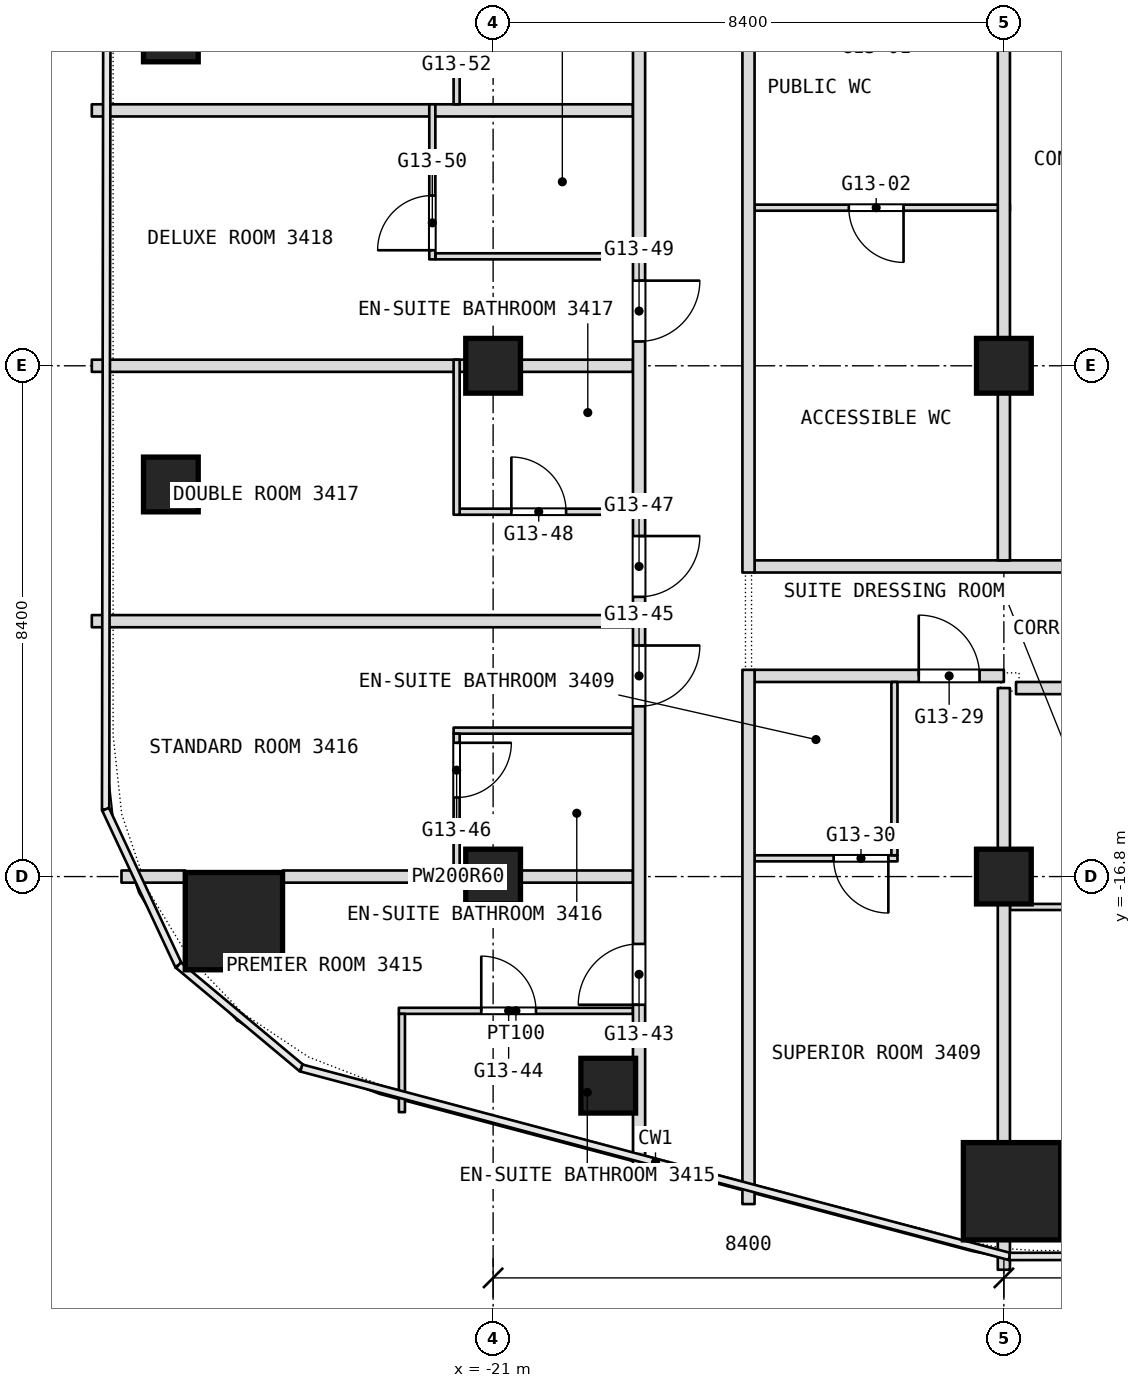
"""IFC4 building model, lengths in metres.
Left out: names, types, materials, properties, quantities, classifications, styles, units other than length and angle.
Written with IfcOpenShell. Run it as: python <this file> out.ifc"""

import sys

from ifc_helpers import new_model, si_unit, direction, frame, frame_2d, origin, origin_2d, place, context, subcontext, project, spatial, rectangle, extrude, element, fill, save


model = new_model("IFC4")
c1 = context("Model", 3, precision=1e-05, world=origin(), true_north=direction((0.0, 1.0)))
c2 = subcontext(c1, "Body", "Model", "MODEL_VIEW")
j1 = project(units=[si_unit("LENGTHUNIT", "METRE"), si_unit("PLANEANGLEUNIT", "RADIAN")], contexts=[c1])
p1 = place(None, origin())
s1 = spatial("IfcSite", under=j1, at=p1, CompositionType="ELEMENT")
p2 = place(p1, origin())
s2 = spatial("IfcBuilding", under=s1, at=p2, CompositionType="ELEMENT")
p3 = place(p2, frame((0.0, 0.0, 148.1)))
s3 = spatial("IfcBuildingStorey", under=s2, at=p3, CompositionType="ELEMENT", Elevation=148.1)
for number, where, z_axis, x_axis in (
    (1, (-25.263, -17.533, 0.0), (0.0, 0.0, 1.0), (1.0, 0.0, 0.0)),
    (2, (-12.466, -21.975, 0.0), (0.0, 0.0, 1.0), (1.0, 0.0, 0.0)),
):
    element("IfcColumn", number, at=place(p3, frame(where, z_axis=z_axis, x_axis=x_axis)), inside=s3, PredefinedType="COLUMN", context=c2, shape_type="SweptSolid", body=[
        extrude(rectangle(XDim=1.6, YDim=1.6, at=origin_2d()), origin(), (0.0, 0.0, 1.0), 3.6),
    ])
for number, where, z_axis, x_axis in (
    (3, (-21.0, -16.8, 0.0), (0.0, 0.0, 1.0), (1.0, 0.0, 0.0)),
    (4, (-21.0, -8.4, 0.0), (0.0, 0.0, 1.0), (1.0, 0.0, 0.0)),
    (5, (-12.6, -16.8, 0.0), (0.0, 0.0, 1.0), (1.0, 0.0, 0.0)),
    (6, (-12.6, -8.4, 0.0), (0.0, 0.0, 1.0), (1.0, 0.0, 0.0)),
    (7, (-26.3, -10.352, 0.0), (0.0, 0.0, 1.0), (1.0, 0.0, 0.0)),
    (8, (-26.3, -2.951, 0.0), (0.0, 0.0, 1.0), (1.0, 0.0, 0.0)),
    (9, (-19.107, -20.239, 0.0), (0.0, 0.0, 1.0), (1.0, 0.0, 0.0)),
):
    element("IfcColumn", number, at=place(p3, frame(where, z_axis=z_axis, x_axis=x_axis)), inside=s3, PredefinedType="COLUMN", context=c2, shape_type="SweptSolid", body=[
        extrude(rectangle(XDim=0.9, YDim=0.9, at=origin_2d()), origin(), (0.0, 0.0, 1.0), 3.6),
    ])
p4 = place(p3, frame((-22.55, -19.008, 0.0), z_axis=(0.0, 0.0, 1.0), x_axis=(1.0, 0.0, 0.0)))
e10 = element("IfcWall", 10, at=p4, inside=s3, PredefinedType="PARTITIONING", context=c2, shape_type="SweptSolid", body=[
    extrude(rectangle(XDim=3.85, YDim=0.1, at=frame_2d((1.925, 0.0))), origin(), (0.0, 0.0, 1.0), 3.34),
])
p5 = place(p4, frame((1.355, 0.0, 0.0)))
e11 = element("IfcOpeningElement", 11, at=p5, cuts=e10, PredefinedType="OPENING", context=c2, shape_type="SweptSolid", body=[
    extrude(rectangle(XDim=0.9, YDim=2.1, at=frame_2d((0.45, 1.05))), frame((0.0, 0.05, 0.0), z_axis=(0.0, -1.0, 0.0), x_axis=(1.0, 0.0, 0.0)), (0.0, 0.0, 1.0), 0.1),
])
p6 = place(p3, frame((-12.5, -17.3, 0.0), z_axis=(0.0, 0.0, 1.0), x_axis=(1.0, 0.0, 0.0)))
e12 = element("IfcWall", 12, at=p6, inside=s3, PredefinedType="PARTITIONING", context=c2, shape_type="SweptSolid", body=[
    extrude(rectangle(XDim=2.35, YDim=0.1, at=frame_2d((1.175, 0.0))), origin(), (0.0, 0.0, 1.0), 3.34),
])
p7 = place(p6, frame((1.3, 0.0, 0.0)))
e13 = element("IfcOpeningElement", 13, at=p7, cuts=e12, PredefinedType="OPENING", context=c2, shape_type="SweptSolid", body=[
    extrude(rectangle(XDim=0.9, YDim=2.1, at=frame_2d((0.45, 1.05))), frame((0.0, 0.05, 0.0), z_axis=(0.0, -1.0, 0.0), x_axis=(1.0, 0.0, 0.0)), (0.0, 0.0, 1.0), 0.1),
])
p8 = place(p3, frame((-27.112, -16.8, 0.0), z_axis=(0.0, 0.0, 1.0), x_axis=(1.0, 0.0, 0.0)))
e14 = element("IfcWall", 14, at=p8, inside=s3, PredefinedType="PARTITIONING", context=c2, shape_type="SweptSolid", body=[
    extrude(rectangle(XDim=1.049, YDim=0.2, at=frame_2d((0.524, 0.0))), origin(), (0.0, 0.0, 1.0), 3.34),
])
p9 = place(p3, frame((-24.463, -16.8, 0.0), z_axis=(0.0, 0.0, 1.0), x_axis=(1.0, 0.0, 0.0)))
e15 = element("IfcWall", 15, at=p9, inside=s3, PredefinedType="PARTITIONING", context=c2, shape_type="SweptSolid", body=[
    extrude(rectangle(XDim=5.763, YDim=0.2, at=frame_2d((2.881, 0.0))), origin(), (0.0, 0.0, 1.0), 2.89),
])
p10 = place(p3, frame((-16.7, -16.5, 0.0), z_axis=(0.0, 0.0, 1.0), x_axis=(1.0, 0.0, 0.0)))
e16 = element("IfcWall", 16, at=p10, inside=s3, PredefinedType="PARTITIONING", context=c2, shape_type="SweptSolid", body=[
    extrude(rectangle(XDim=2.35, YDim=0.1, at=frame_2d((1.175, 0.0))), origin(), (0.0, 0.0, 1.0), 3.34),
])
p11 = place(p10, frame((1.3, 0.0, 0.0)))
e17 = element("IfcOpeningElement", 17, at=p11, cuts=e16, PredefinedType="OPENING", context=c2, shape_type="SweptSolid", body=[
    extrude(rectangle(XDim=0.9, YDim=2.1, at=frame_2d((0.45, 1.05))), frame((0.0, 0.05, 0.0), z_axis=(0.0, -1.0, 0.0), x_axis=(1.0, 0.0, 0.0)), (0.0, 0.0, 1.0), 0.1),
])
p12 = place(p3, frame((-21.65, -14.4, 0.0), z_axis=(0.0, 0.0, 1.0), x_axis=(1.0, 0.0, 0.0)))
e18 = element("IfcWall", 18, at=p12, inside=s3, PredefinedType="PARTITIONING", context=c2, shape_type="SweptSolid", body=[
    extrude(rectangle(XDim=2.95, YDim=0.1, at=frame_2d((1.475, 0.0))), origin(), (0.0, 0.0, 1.0), 3.34),
])
p13 = place(p3, frame((-12.4, -13.7, 0.0), z_axis=(0.0, 0.0, 1.0), x_axis=(1.0, 0.0, 0.0)))
e19 = element("IfcWall", 19, at=p13, inside=s3, PredefinedType="PARTITIONING", context=c2, shape_type="SweptSolid", body=[
    extrude(rectangle(XDim=9.2, YDim=0.2, at=frame_2d((4.6, 0.0))), origin(), (0.0, 0.0, 1.0), 3.34),
])
p14 = place(p13, frame((3.4, 0.0, 0.0)))
e20 = element("IfcOpeningElement", 20, at=p14, cuts=e19, PredefinedType="OPENING", context=c2, shape_type="SweptSolid", body=[
    extrude(rectangle(XDim=1.1, YDim=2.1, at=frame_2d((0.55, 1.05))), frame((0.0, 0.1, 0.0), z_axis=(0.0, -1.0, 0.0), x_axis=(1.0, 0.0, 0.0)), (0.0, 0.0, 1.0), 0.2),
])
p15 = place(p3, frame((-16.7, -13.5, 0.0), z_axis=(0.0, 0.0, 1.0), x_axis=(1.0, 0.0, 0.0)))
e21 = element("IfcWall", 21, at=p15, inside=s3, PredefinedType="PARTITIONING", context=c2, shape_type="SweptSolid", body=[
    extrude(rectangle(XDim=4.1, YDim=0.2, at=frame_2d((2.05, 0.0))), origin(), (0.0, 0.0, 1.0), 3.34),
])
p16 = place(p15, frame((2.7, 0.0, 0.0)))
e22 = element("IfcOpeningElement", 22, at=p16, cuts=e21, PredefinedType="OPENING", context=c2, shape_type="SweptSolid", body=[
    extrude(rectangle(XDim=1.0, YDim=2.1, at=frame_2d((0.5, 1.05))), frame((0.0, 0.1, 0.0), z_axis=(0.0, -1.0, 0.0), x_axis=(1.0, 0.0, 0.0)), (0.0, 0.0, 1.0), 0.2),
])
p17 = place(p3, frame((-27.6, -12.6, 0.0), z_axis=(0.0, 0.0, 1.0), x_axis=(1.0, 0.0, 0.0)))
e23 = element("IfcWall", 23, at=p17, inside=s3, PredefinedType="PARTITIONING", context=c2, shape_type="SweptSolid", body=[
    extrude(rectangle(XDim=8.9, YDim=0.2, at=frame_2d((4.45, 0.0))), origin(), (0.0, 0.0, 1.0), 3.34),
])
p18 = place(p3, frame((-16.7, -11.7, 0.0), z_axis=(0.0, 0.0, 1.0), x_axis=(1.0, 0.0, 0.0)))
e24 = element("IfcWall", 24, at=p18, inside=s3, PredefinedType="PARTITIONING", context=c2, shape_type="SweptSolid", body=[
    extrude(rectangle(XDim=5.8, YDim=0.2, at=frame_2d((2.9, 0.0))), origin(), (0.0, 0.0, 1.0), 3.34),
])
p19 = place(p3, frame((-21.55, -10.8, 0.0), z_axis=(0.0, 0.0, 1.0), x_axis=(1.0, 0.0, 0.0)))
e25 = element("IfcWall", 25, at=p19, inside=s3, PredefinedType="PARTITIONING", context=c2, shape_type="SweptSolid", body=[
    extrude(rectangle(XDim=2.85, YDim=0.1, at=frame_2d((1.425, 0.0))), origin(), (0.0, 0.0, 1.0), 3.34),
])
p20 = place(p19, frame((0.85, 0.0, 0.0)))
e26 = element("IfcOpeningElement", 26, at=p20, cuts=e25, PredefinedType="OPENING", context=c2, shape_type="SweptSolid", body=[
    extrude(rectangle(XDim=0.9, YDim=2.1, at=frame_2d((0.45, 1.05))), frame((0.0, 0.05, 0.0), z_axis=(0.0, -1.0, 0.0), x_axis=(1.0, 0.0, 0.0)), (0.0, 0.0, 1.0), 0.1),
])
p21 = place(p3, frame((-27.6, -8.4, 0.0), z_axis=(0.0, 0.0, 1.0), x_axis=(1.0, 0.0, 0.0)))
e27 = element("IfcWall", 27, at=p21, inside=s3, PredefinedType="PARTITIONING", context=c2, shape_type="SweptSolid", body=[
    extrude(rectangle(XDim=8.9, YDim=0.2, at=frame_2d((4.45, 0.0))), origin(), (0.0, 0.0, 1.0), 2.89),
])
p22 = place(p3, frame((-21.95, -6.6, 0.0), z_axis=(0.0, 0.0, 1.0), x_axis=(1.0, 0.0, 0.0)))
e28 = element("IfcWall", 28, at=p22, inside=s3, PredefinedType="PARTITIONING", context=c2, shape_type="SweptSolid", body=[
    extrude(rectangle(XDim=3.25, YDim=0.1, at=frame_2d((1.625, 0.0))), origin(), (0.0, 0.0, 1.0), 3.34),
])
p23 = place(p3, frame((-16.7, -5.8, 0.0), z_axis=(0.0, 0.0, 1.0), x_axis=(1.0, 0.0, 0.0)))
e29 = element("IfcWall", 29, at=p23, inside=s3, PredefinedType="PARTITIONING", context=c2, shape_type="SweptSolid", body=[
    extrude(rectangle(XDim=4.2, YDim=0.1, at=frame_2d((2.1, 0.0))), origin(), (0.0, 0.0, 1.0), 3.34),
])
p24 = place(p23, frame((1.55, 0.0, 0.0)))
e30 = element("IfcOpeningElement", 30, at=p24, cuts=e29, PredefinedType="OPENING", context=c2, shape_type="SweptSolid", body=[
    extrude(rectangle(XDim=0.9, YDim=2.1, at=frame_2d((0.45, 1.05))), frame((0.0, 0.05, 0.0), z_axis=(0.0, -1.0, 0.0), x_axis=(1.0, 0.0, 0.0)), (0.0, 0.0, 1.0), 0.1),
])
p25 = place(p3, frame((-27.6, -4.2, 0.0), z_axis=(0.0, 0.0, 1.0), x_axis=(1.0, 0.0, 0.0)))
e31 = element("IfcWall", 31, at=p25, inside=s3, PredefinedType="PARTITIONING", context=c2, shape_type="SweptSolid", body=[
    extrude(rectangle(XDim=8.9, YDim=0.2, at=frame_2d((4.45, 0.0))), origin(), (0.0, 0.0, 1.0), 3.34),
])
p26 = place(p3, frame((-12.6, -23.266, 0.0), z_axis=(0.0, 0.0, 1.0), x_axis=(0.0, 1.0, 0.0)))
e32 = element("IfcWall", 32, at=p26, inside=s3, PredefinedType="PARTITIONING", context=c2, shape_type="SweptSolid", body=[
    extrude(rectangle(XDim=0.491, YDim=0.2, at=frame_2d((0.246, 0.0))), origin(), (0.0, 0.0, 1.0), 3.34),
])
p27 = place(p3, frame((-12.6, -21.175, 0.0), z_axis=(0.0, 0.0, 1.0), x_axis=(0.0, 1.0, 0.0)))
e33 = element("IfcWall", 33, at=p27, inside=s3, PredefinedType="PARTITIONING", context=c2, shape_type="SweptSolid", body=[
    extrude(rectangle(XDim=7.475, YDim=0.2, at=frame_2d((3.738, 0.0))), origin(), (0.0, 0.0, 1.0), 3.34),
])
p28 = place(p3, frame((-12.6, -11.6, 0.0), z_axis=(0.0, 0.0, 1.0), x_axis=(0.0, 1.0, 0.0)))
e34 = element("IfcWall", 34, at=p28, inside=s3, PredefinedType="PARTITIONING", context=c2, shape_type="SweptSolid", body=[
    extrude(rectangle(XDim=9.7, YDim=0.2, at=frame_2d((4.85, 0.0))), origin(), (0.0, 0.0, 1.0), 3.34),
])
p29 = place(p3, frame((-14.4, -16.45, 0.0), z_axis=(0.0, 0.0, 1.0), x_axis=(0.0, 1.0, 0.0)))
e35 = element("IfcWall", 35, at=p29, inside=s3, PredefinedType="PARTITIONING", context=c2, shape_type="SweptSolid", body=[
    extrude(rectangle(XDim=2.85, YDim=0.1, at=frame_2d((1.425, 0.0))), origin(), (0.0, 0.0, 1.0), 3.34),
])
p30 = place(p3, frame((-16.8, -22.186, 0.0), z_axis=(0.0, 0.0, 1.0), x_axis=(0.0, 1.0, 0.0)))
e36 = element("IfcWall", 36, at=p30, inside=s3, PredefinedType="PARTITIONING", context=c2, shape_type="SweptSolid", body=[
    extrude(rectangle(XDim=8.786, YDim=0.2, at=frame_2d((4.393, 0.0))), origin(), (0.0, 0.0, 1.0), 3.34),
])
p31 = place(p3, frame((-16.8, -11.8, 0.0), z_axis=(0.0, 0.0, 1.0), x_axis=(0.0, 1.0, 0.0)))
e37 = element("IfcWall", 37, at=p31, inside=s3, PredefinedType="PARTITIONING", context=c2, shape_type="SweptSolid", body=[
    extrude(rectangle(XDim=9.9, YDim=0.2, at=frame_2d((4.95, 0.0))), origin(), (0.0, 0.0, 1.0), 3.34),
])
p32 = place(p3, frame((-18.6, -21.708, 0.0), z_axis=(0.0, 0.0, 1.0), x_axis=(0.0, 1.0, 0.0)))
e38 = element("IfcWall", 38, at=p32, inside=s3, PredefinedType="PARTITIONING", context=c2, shape_type="SweptSolid", body=[
    extrude(rectangle(XDim=28.608, YDim=0.2, at=frame_2d((14.304, 0.0))), origin(), (0.0, 0.0, 1.0), 3.34),
])
p33 = place(p32, frame((2.8, 0.0, 0.0)))
e39 = element("IfcOpeningElement", 39, at=p33, cuts=e38, PredefinedType="OPENING", context=c2, shape_type="SweptSolid", body=[
    extrude(rectangle(XDim=1.0, YDim=2.1, at=frame_2d((0.5, 1.05))), frame((0.0, 0.1, 0.0), z_axis=(0.0, -1.0, 0.0), x_axis=(1.0, 0.0, 0.0)), (0.0, 0.0, 1.0), 0.2),
])
p34 = place(p32, frame((7.708, 0.0, 0.0)))
e40 = element("IfcOpeningElement", 40, at=p34, cuts=e38, PredefinedType="OPENING", context=c2, shape_type="SweptSolid", body=[
    extrude(rectangle(XDim=1.0, YDim=2.1, at=frame_2d((0.5, 1.05))), frame((0.0, 0.1, 0.0), z_axis=(0.0, -1.0, 0.0), x_axis=(1.0, 0.0, 0.0)), (0.0, 0.0, 1.0), 0.2),
])
p35 = place(p32, frame((9.508, 0.0, 0.0)))
e41 = element("IfcOpeningElement", 41, at=p35, cuts=e38, PredefinedType="OPENING", context=c2, shape_type="SweptSolid", body=[
    extrude(rectangle(XDim=1.0, YDim=2.1, at=frame_2d((0.5, 1.05))), frame((0.0, 0.1, 0.0), z_axis=(0.0, -1.0, 0.0), x_axis=(1.0, 0.0, 0.0)), (0.0, 0.0, 1.0), 0.2),
])
p36 = place(p32, frame((13.708, 0.0, 0.0)))
e42 = element("IfcOpeningElement", 42, at=p36, cuts=e38, PredefinedType="OPENING", context=c2, shape_type="SweptSolid", body=[
    extrude(rectangle(XDim=1.0, YDim=2.1, at=frame_2d((0.5, 1.05))), frame((0.0, 0.1, 0.0), z_axis=(0.0, -1.0, 0.0), x_axis=(1.0, 0.0, 0.0)), (0.0, 0.0, 1.0), 0.2),
])
p37 = place(p32, frame((20.308, 0.0, 0.0)))
e43 = element("IfcOpeningElement", 43, at=p37, cuts=e38, PredefinedType="OPENING", context=c2, shape_type="SweptSolid", body=[
    extrude(rectangle(XDim=1.0, YDim=2.1, at=frame_2d((0.5, 1.05))), frame((0.0, 0.1, 0.0), z_axis=(0.0, -1.0, 0.0), x_axis=(1.0, 0.0, 0.0)), (0.0, 0.0, 1.0), 0.2),
])
p38 = place(p3, frame((-21.6, -16.7, 0.0), z_axis=(0.0, 0.0, 1.0), x_axis=(0.0, 1.0, 0.0)))
e44 = element("IfcWall", 44, at=p38, inside=s3, PredefinedType="PARTITIONING", context=c2, shape_type="SweptSolid", body=[
    extrude(rectangle(XDim=2.25, YDim=0.1, at=frame_2d((1.125, 0.0))), origin(), (0.0, 0.0, 1.0), 3.34),
])
p39 = place(p38, frame((1.2, 0.0, 0.0)))
e45 = element("IfcOpeningElement", 45, at=p39, cuts=e44, PredefinedType="OPENING", context=c2, shape_type="SweptSolid", body=[
    extrude(rectangle(XDim=0.9, YDim=2.1, at=frame_2d((0.45, 1.05))), frame((0.0, 0.05, 0.0), z_axis=(0.0, -1.0, 0.0), x_axis=(1.0, 0.0, 0.0)), (0.0, 0.0, 1.0), 0.1),
])
p40 = place(p3, frame((-21.6, -10.85, 0.0), z_axis=(0.0, 0.0, 1.0), x_axis=(0.0, 1.0, 0.0)))
e46 = element("IfcWall", 46, at=p40, inside=s3, PredefinedType="PARTITIONING", context=c2, shape_type="SweptSolid", body=[
    extrude(rectangle(XDim=2.55, YDim=0.1, at=frame_2d((1.275, 0.0))), origin(), (0.0, 0.0, 1.0), 3.34),
])
p41 = place(p3, frame((-21.6, -4.1, 0.0), z_axis=(0.0, 0.0, 1.0), x_axis=(0.0, 1.0, 0.0)))
e47 = element("IfcWall", 47, at=p41, inside=s3, PredefinedType="PARTITIONING", context=c2, shape_type="SweptSolid", body=[
    extrude(rectangle(XDim=2.25, YDim=0.1, at=frame_2d((1.125, 0.0))), origin(), (0.0, 0.0, 1.0), 3.34),
])
p42 = place(p41, frame((1.2, 0.0, 0.0)))
e48 = element("IfcOpeningElement", 48, at=p42, cuts=e47, PredefinedType="OPENING", context=c2, shape_type="SweptSolid", body=[
    extrude(rectangle(XDim=0.9, YDim=2.1, at=frame_2d((0.45, 1.05))), frame((0.0, 0.05, 0.0), z_axis=(0.0, -1.0, 0.0), x_axis=(1.0, 0.0, 0.0)), (0.0, 0.0, 1.0), 0.1),
])
p43 = place(p3, frame((-22.0, -6.65, 0.0), z_axis=(0.0, 0.0, 1.0), x_axis=(0.0, 1.0, 0.0)))
e49 = element("IfcWall", 49, at=p43, inside=s3, PredefinedType="PARTITIONING", context=c2, shape_type="SweptSolid", body=[
    extrude(rectangle(XDim=2.55, YDim=0.1, at=frame_2d((1.275, 0.0))), origin(), (0.0, 0.0, 1.0), 3.34),
])
p44 = place(p43, frame((0.15, 0.0, 0.0)))
e50 = element("IfcOpeningElement", 50, at=p44, cuts=e49, PredefinedType="OPENING", context=c2, shape_type="SweptSolid", body=[
    extrude(rectangle(XDim=0.9, YDim=2.1, at=frame_2d((0.45, 1.05))), frame((0.0, 0.05, 0.0), z_axis=(0.0, -1.0, 0.0), x_axis=(1.0, 0.0, 0.0)), (0.0, 0.0, 1.0), 0.1),
])
p45 = place(p3, frame((-22.5, -20.674, 0.0), z_axis=(0.0, 0.0, 1.0), x_axis=(0.0, 1.0, 0.0)))
e51 = element("IfcWall", 51, at=p45, inside=s3, PredefinedType="PARTITIONING", context=c2, shape_type="SweptSolid", body=[
    extrude(rectangle(XDim=1.616, YDim=0.1, at=frame_2d((0.808, 0.0))), origin(), (0.0, 0.0, 1.0), 3.34),
])
p46 = place(p5, origin())
e52 = element("IfcDoor", 52, at=p46, inside=s3, OperationType="SINGLE_SWING_LEFT", PredefinedType="DOOR", context=c2, shape_type="SweptSolid", body=[
    extrude(rectangle(XDim=0.9, YDim=2.1, at=frame_2d((0.45, 1.05))), frame((0.0, 0.025, 0.0), z_axis=(0.0, -1.0, 0.0), x_axis=(1.0, 0.0, 0.0)), (0.0, 0.0, 1.0), 0.05),
])
fill(e11, e52)
p47 = place(p11, origin())
e53 = element("IfcDoor", 53, at=p47, inside=s3, OperationType="SINGLE_SWING_RIGHT", PredefinedType="DOOR", context=c2, shape_type="SweptSolid", body=[
    extrude(rectangle(XDim=0.9, YDim=2.1, at=frame_2d((0.45, 1.05))), frame((0.0, 0.025, 0.0), z_axis=(0.0, -1.0, 0.0), x_axis=(1.0, 0.0, 0.0)), (0.0, 0.0, 1.0), 0.05),
])
fill(e17, e53)
p48 = place(p16, origin())
e54 = element("IfcDoor", 54, at=p48, inside=s3, OperationType="SINGLE_SWING_LEFT", PredefinedType="DOOR", context=c2, shape_type="SweptSolid", body=[
    extrude(rectangle(XDim=1.0, YDim=2.1, at=frame_2d((0.5, 1.05))), frame((0.0, 0.025, 0.0), z_axis=(0.0, -1.0, 0.0), x_axis=(1.0, 0.0, 0.0)), (0.0, 0.0, 1.0), 0.05),
])
fill(e22, e54)
p49 = place(p20, origin())
e55 = element("IfcDoor", 55, at=p49, inside=s3, OperationType="SINGLE_SWING_LEFT", PredefinedType="DOOR", context=c2, shape_type="SweptSolid", body=[
    extrude(rectangle(XDim=0.9, YDim=2.1, at=frame_2d((0.45, 1.05))), frame((0.0, 0.025, 0.0), z_axis=(0.0, -1.0, 0.0), x_axis=(1.0, 0.0, 0.0)), (0.0, 0.0, 1.0), 0.05),
])
fill(e26, e55)
p50 = place(p24, origin())
e56 = element("IfcDoor", 56, at=p50, inside=s3, OperationType="SINGLE_SWING_RIGHT", PredefinedType="DOOR", context=c2, shape_type="SweptSolid", body=[
    extrude(rectangle(XDim=0.9, YDim=2.1, at=frame_2d((0.45, 1.05))), frame((0.0, 0.025, 0.0), z_axis=(0.0, -1.0, 0.0), x_axis=(1.0, 0.0, 0.0)), (0.0, 0.0, 1.0), 0.05),
])
fill(e30, e56)
p51 = place(p33, origin())
e57 = element("IfcDoor", 57, at=p51, inside=s3, OperationType="SINGLE_SWING_LEFT", PredefinedType="DOOR", context=c2, shape_type="SweptSolid", body=[
    extrude(rectangle(XDim=1.0, YDim=2.1, at=frame_2d((0.5, 1.05))), frame((0.0, 0.025, 0.0), z_axis=(0.0, -1.0, 0.0), x_axis=(1.0, 0.0, 0.0)), (0.0, 0.0, 1.0), 0.05),
])
fill(e39, e57)
p52 = place(p34, origin())
e58 = element("IfcDoor", 58, at=p52, inside=s3, OperationType="SINGLE_SWING_RIGHT", PredefinedType="DOOR", context=c2, shape_type="SweptSolid", body=[
    extrude(rectangle(XDim=1.0, YDim=2.1, at=frame_2d((0.5, 1.05))), frame((0.0, 0.025, 0.0), z_axis=(0.0, -1.0, 0.0), x_axis=(1.0, 0.0, 0.0)), (0.0, 0.0, 1.0), 0.05),
])
fill(e40, e58)
p53 = place(p35, origin())
e59 = element("IfcDoor", 59, at=p53, inside=s3, OperationType="SINGLE_SWING_RIGHT", PredefinedType="DOOR", context=c2, shape_type="SweptSolid", body=[
    extrude(rectangle(XDim=1.0, YDim=2.1, at=frame_2d((0.5, 1.05))), frame((0.0, 0.025, 0.0), z_axis=(0.0, -1.0, 0.0), x_axis=(1.0, 0.0, 0.0)), (0.0, 0.0, 1.0), 0.05),
])
fill(e41, e59)
p54 = place(p36, origin())
e60 = element("IfcDoor", 60, at=p54, inside=s3, OperationType="SINGLE_SWING_RIGHT", PredefinedType="DOOR", context=c2, shape_type="SweptSolid", body=[
    extrude(rectangle(XDim=1.0, YDim=2.1, at=frame_2d((0.5, 1.05))), frame((0.0, 0.025, 0.0), z_axis=(0.0, -1.0, 0.0), x_axis=(1.0, 0.0, 0.0)), (0.0, 0.0, 1.0), 0.05),
])
fill(e42, e60)
p55 = place(p39, origin())
e61 = element("IfcDoor", 61, at=p55, inside=s3, OperationType="SINGLE_SWING_LEFT", PredefinedType="DOOR", context=c2, shape_type="SweptSolid", body=[
    extrude(rectangle(XDim=0.9, YDim=2.1, at=frame_2d((0.45, 1.05))), frame((0.0, 0.025, 0.0), z_axis=(0.0, -1.0, 0.0), x_axis=(1.0, 0.0, 0.0)), (0.0, 0.0, 1.0), 0.05),
])
fill(e45, e61)
p56 = place(p44, origin())
e62 = element("IfcDoor", 62, at=p56, inside=s3, OperationType="SINGLE_SWING_RIGHT", PredefinedType="DOOR", context=c2, shape_type="SweptSolid", body=[
    extrude(rectangle(XDim=0.9, YDim=2.1, at=frame_2d((0.45, 1.05))), frame((0.0, 0.025, 0.0), z_axis=(0.0, -1.0, 0.0), x_axis=(1.0, 0.0, 0.0)), (0.0, 0.0, 1.0), 0.05),
])
fill(e50, e62)
save(model, sys.argv[1])
